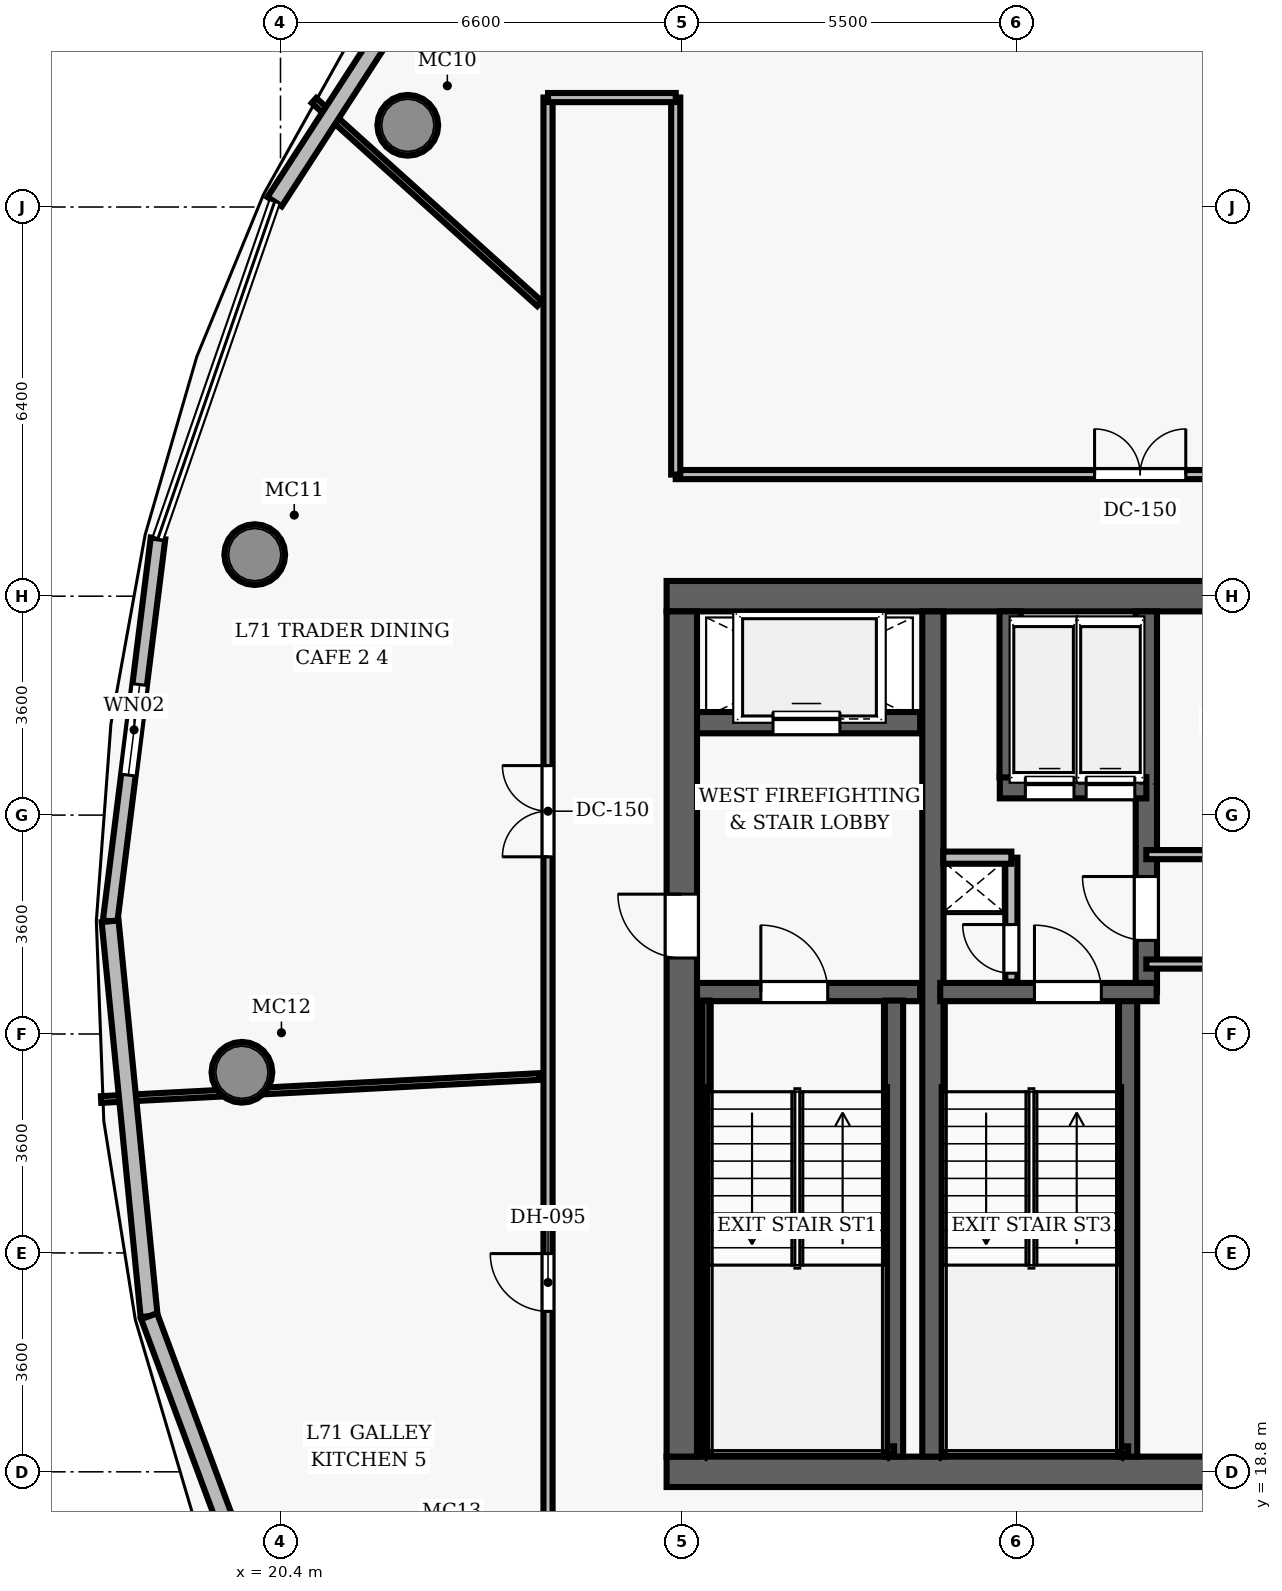
"""IFC4 building model, lengths in metres.
Left out: names, types, materials, properties, quantities, classifications, styles, units other than length and angle.
Written with IfcOpenShell. Run it as: python <this file> out.ifc"""

import sys

from ifc_helpers import new_model, si_unit, direction, frame, frame_2d, origin, origin_2d, place, context, subcontext, project, spatial, rectangle, hollow_circle, extrude, element, fill, save


model = new_model("IFC4")
c1 = context("Model", 3, precision=1e-05, world=origin(), true_north=direction((0.0, 1.0)))
c2 = subcontext(c1, "Body", "Model", "MODEL_VIEW")
j1 = project(units=[si_unit("LENGTHUNIT", "METRE"), si_unit("PLANEANGLEUNIT", "RADIAN")], contexts=[c1])
p1 = place(None, origin())
s1 = spatial("IfcSite", under=j1, at=p1, CompositionType="ELEMENT")
p2 = place(p1, origin())
s2 = spatial("IfcBuilding", under=s1, at=p2, CompositionType="ELEMENT")
p3 = place(p2, frame((0.0, 0.0, 280.55)))
s3 = spatial("IfcBuildingStorey", under=s2, at=p3, CompositionType="ELEMENT", Elevation=280.55)
p4 = place(p3, frame((26.75, 18.8, 0.0), z_axis=(0.0, 0.0, 1.0), x_axis=(1.0, 0.0, 0.0)))
e1 = element("IfcWall", 1, at=p4, inside=s3, PredefinedType="SHEAR", context=c2, shape_type="SweptSolid", body=[
    extrude(rectangle(XDim=22.5, YDim=0.5, at=frame_2d((11.25, 0.0))), origin(), (0.0, 0.0, 1.0), 3.85),
])
p5 = place(p4, frame((14.47, 0.0, 0.0)))
e2 = element("IfcOpeningElement", 2, at=p5, cuts=e1, PredefinedType="OPENING", context=c2, shape_type="SweptSolid", body=[
    extrude(rectangle(XDim=1.05, YDim=2.15, at=frame_2d((0.525, 1.075))), frame((0.0, 0.26, 0.0), z_axis=(0.0, -1.0, 0.0), x_axis=(1.0, 0.0, 0.0)), (0.0, 0.0, 1.0), 0.52),
])
p6 = place(p3, frame((26.75, 33.2, 0.0), z_axis=(0.0, 0.0, 1.0), x_axis=(1.0, 0.0, 0.0)))
e3 = element("IfcWall", 3, at=p6, inside=s3, PredefinedType="SHEAR", context=c2, shape_type="SweptSolid", body=[
    extrude(rectangle(XDim=22.5, YDim=0.5, at=frame_2d((11.25, 0.0))), origin(), (0.0, 0.0, 1.0), 3.85),
])
p7 = place(p3, frame((27.0, 19.05, 0.0), z_axis=(0.0, 0.0, 1.0), x_axis=(0.0, 1.0, 0.0)))
e4 = element("IfcWall", 4, at=p7, inside=s3, PredefinedType="SHEAR", context=c2, shape_type="SweptSolid", body=[
    extrude(rectangle(XDim=13.9, YDim=0.5, at=frame_2d((6.95, 0.0))), origin(), (0.0, 0.0, 1.0), 3.85),
])
p8 = place(p7, frame((8.2, 0.0, 0.0)))
e5 = element("IfcOpeningElement", 5, at=p8, cuts=e4, PredefinedType="OPENING", context=c2, shape_type="SweptSolid", body=[
    extrude(rectangle(XDim=1.05, YDim=2.15, at=frame_2d((0.525, 1.075))), frame((0.0, 0.26, 0.0), z_axis=(0.0, -1.0, 0.0), x_axis=(1.0, 0.0, 0.0)), (0.0, 0.0, 1.0), 0.52),
])
p9 = place(p3, frame((31.13, 19.05, 0.0), z_axis=(0.0, 0.0, 1.0), x_axis=(0.0, 1.0, 0.0)))
e6 = element("IfcWall", 6, at=p9, inside=s3, PredefinedType="SHEAR", context=c2, shape_type="SweptSolid", body=[
    extrude(rectangle(XDim=13.9, YDim=0.35, at=frame_2d((6.95, 0.0))), origin(), (0.0, 0.0, 1.0), 3.85),
])
for number, where, z_axis, x_axis in (
    (7, (22.494, 40.944, 0.0), (0.0, 0.0, 1.0), (1.0, 0.0, 0.0)),
    (8, (19.976, 33.884, 0.0), (0.0, 0.0, 1.0), (1.0, 0.0, 0.0)),
    (9, (19.765, 25.371, 0.0), (0.0, 0.0, 1.0), (1.0, 0.0, 0.0)),
):
    element("IfcColumn", number, at=place(p3, frame(where, z_axis=z_axis, x_axis=x_axis)), inside=s3, PredefinedType="COLUMN", context=c2, shape_type="SweptSolid", body=[
        extrude(hollow_circle(Radius=0.5, WallThickness=0.045, at=origin_2d()), origin(), (0.0, 0.0, 1.0), 3.85),
    ])
p10 = place(p3, frame((27.25, 26.69, 0.0), z_axis=(0.0, 0.0, 1.0), x_axis=(1.0, 0.0, 0.0)))
e10 = element("IfcWall", 10, at=p10, inside=s3, PredefinedType="SHEAR", context=c2, shape_type="SweptSolid", body=[
    extrude(rectangle(XDim=3.67, YDim=0.3, at=frame_2d((1.835, 0.0))), origin(), (0.0, 0.0, 1.0), 3.85),
])
p11 = place(p10, frame((1.05, 0.0, 0.0)))
e11 = element("IfcOpeningElement", 11, at=p11, cuts=e10, PredefinedType="OPENING", context=c2, shape_type="SweptSolid", body=[
    extrude(rectangle(XDim=1.1, YDim=2.15, at=frame_2d((0.55, 1.075))), frame((0.0, 0.16, 0.0), z_axis=(0.0, -1.0, 0.0), x_axis=(1.0, 0.0, 0.0)), (0.0, 0.0, 1.0), 0.32),
])
p12 = place(p3, frame((30.49, 19.05, 0.0), z_axis=(0.0, 0.0, 1.0), x_axis=(0.0, 1.0, 0.0)))
e12 = element("IfcWall", 12, at=p12, inside=s3, PredefinedType="SHEAR", context=c2, shape_type="SweptSolid", body=[
    extrude(rectangle(XDim=7.5, YDim=0.3, at=frame_2d((3.75, 0.0))), origin(), (0.0, 0.0, 1.0), 3.85),
])
p13 = place(p3, frame((27.395, 19.1, 0.0), z_axis=(0.0, 0.0, 1.0), x_axis=(0.0, 1.0, 0.0)))
e13 = element("IfcWall", 13, at=p13, inside=s3, PredefinedType="SHEAR", context=c2, shape_type="SweptSolid", body=[
    extrude(rectangle(XDim=7.45, YDim=0.12, at=frame_2d((3.725, 0.0))), origin(), (0.0, 0.0, 1.0), 3.85),
])
p14 = place(p3, frame((27.395, 19.16, 0.0), z_axis=(0.0, 0.0, 1.0), x_axis=(1.0, 0.0, 0.0)))
e14 = element("IfcWall", 14, at=p14, inside=s3, PredefinedType="SHEAR", context=c2, shape_type="SweptSolid", body=[
    extrude(rectangle(XDim=3.095, YDim=0.12, at=frame_2d((1.547, 0.0))), origin(), (0.0, 0.0, 1.0), 3.85),
])
p15 = place(p3, frame((27.25, 31.12, 0.0), z_axis=(0.0, 0.0, 1.0), x_axis=(1.0, 0.0, 0.0)))
e15 = element("IfcWall", 15, at=p15, inside=s3, PredefinedType="SHEAR", context=c2, shape_type="SweptSolid", body=[
    extrude(rectangle(XDim=3.67, YDim=0.35, at=frame_2d((1.835, 0.0))), origin(), (0.0, 0.0, 1.0), 3.04),
])
p16 = place(p15, frame((1.25, 0.0, 0.0)))
e16 = element("IfcOpeningElement", 16, at=p16, cuts=e15, PredefinedType="OPENING", context=c2, shape_type="SweptSolid", body=[
    extrude(rectangle(XDim=1.1, YDim=2.15, at=frame_2d((0.55, 1.075))), frame((0.0, 0.185, 0.0), z_axis=(0.0, -1.0, 0.0), x_axis=(1.0, 0.0, 0.0)), (0.0, 0.0, 1.0), 0.37),
])
p17 = place(p3, frame((34.34, 19.05, 0.0), z_axis=(0.0, 0.0, 1.0), x_axis=(0.0, 1.0, 0.0)))
e17 = element("IfcWall", 17, at=p17, inside=s3, PredefinedType="SHEAR", context=c2, shape_type="SweptSolid", body=[
    extrude(rectangle(XDim=7.5, YDim=0.3, at=frame_2d((3.75, 0.0))), origin(), (0.0, 0.0, 1.0), 3.85),
])
p18 = place(p3, frame((34.64, 26.69, 0.0), z_axis=(0.0, 0.0, 1.0), x_axis=(0.0, 1.0, 0.0)))
e18 = element("IfcWall", 18, at=p18, inside=s3, PredefinedType="SHEAR", context=c2, shape_type="SweptSolid", body=[
    extrude(rectangle(XDim=6.26, YDim=0.35, at=frame_2d((3.13, 0.0))), origin(), (0.0, 0.0, 1.0), 3.85),
])
p19 = place(p18, frame((0.85, 0.0, 0.0)))
e19 = element("IfcOpeningElement", 19, at=p19, cuts=e18, PredefinedType="OPENING", context=c2, shape_type="SweptSolid", body=[
    extrude(rectangle(XDim=1.05, YDim=2.15, at=frame_2d((0.525, 1.075))), frame((0.0, 0.185, 0.0), z_axis=(0.0, -1.0, 0.0), x_axis=(1.0, 0.0, 0.0)), (0.0, 0.0, 1.0), 0.37),
])
p20 = place(p3, frame((31.25, 26.69, 0.0), z_axis=(0.0, 0.0, 1.0), x_axis=(1.0, 0.0, 0.0)))
e20 = element("IfcWall", 20, at=p20, inside=s3, PredefinedType="SHEAR", context=c2, shape_type="SweptSolid", body=[
    extrude(rectangle(XDim=3.56, YDim=0.3, at=frame_2d((1.78, 0.0))), origin(), (0.0, 0.0, 1.0), 3.85),
])
p21 = place(p20, frame((1.55, 0.0, 0.0)))
e21 = element("IfcOpeningElement", 21, at=p21, cuts=e20, PredefinedType="OPENING", context=c2, shape_type="SweptSolid", body=[
    extrude(rectangle(XDim=1.1, YDim=2.15, at=frame_2d((0.55, 1.075))), frame((0.0, 0.16, 0.0), z_axis=(0.0, -1.0, 0.0), x_axis=(1.0, 0.0, 0.0)), (0.0, 0.0, 1.0), 0.32),
])
p22 = place(p3, frame((31.3, 19.16, 0.0), z_axis=(0.0, 0.0, 1.0), x_axis=(1.0, 0.0, 0.0)))
e22 = element("IfcWall", 22, at=p22, inside=s3, PredefinedType="SHEAR", context=c2, shape_type="SweptSolid", body=[
    extrude(rectangle(XDim=3.04, YDim=0.12, at=frame_2d((1.52, 0.0))), origin(), (0.0, 0.0, 1.0), 3.85),
])
p23 = place(p3, frame((32.23, 30.05, 0.0), z_axis=(0.0, 0.0, 1.0), x_axis=(1.0, 0.0, 0.0)))
e23 = element("IfcWall", 23, at=p23, inside=s3, PredefinedType="SHEAR", context=c2, shape_type="SweptSolid", body=[
    extrude(rectangle(XDim=2.41, YDim=0.35, at=frame_2d((1.205, 0.0))), origin(), (0.0, 0.0, 1.0), 3.04),
])
p24 = place(p23, frame((0.42, 0.0, 0.0)))
e24 = element("IfcOpeningElement", 24, at=p24, cuts=e23, PredefinedType="OPENING", context=c2, shape_type="SweptSolid", body=[
    extrude(rectangle(XDim=0.8, YDim=2.15, at=frame_2d((0.4, 1.075))), frame((0.0, 0.185, 0.0), z_axis=(0.0, -1.0, 0.0), x_axis=(1.0, 0.0, 0.0)), (0.0, 0.0, 1.0), 0.37),
])
p25 = place(p23, frame((1.42, 0.0, 0.0)))
e25 = element("IfcOpeningElement", 25, at=p25, cuts=e23, PredefinedType="OPENING", context=c2, shape_type="SweptSolid", body=[
    extrude(rectangle(XDim=0.8, YDim=2.15, at=frame_2d((0.4, 1.075))), frame((0.0, 0.185, 0.0), z_axis=(0.0, -1.0, 0.0), x_axis=(1.0, 0.0, 0.0)), (0.0, 0.0, 1.0), 0.37),
])
p26 = place(p3, frame((32.4, 30.22, 0.0), z_axis=(0.0, 0.0, 1.0), x_axis=(0.0, 1.0, 0.0)))
e26 = element("IfcWall", 26, at=p26, inside=s3, PredefinedType="SHEAR", context=c2, shape_type="SweptSolid", body=[
    extrude(rectangle(XDim=2.73, YDim=0.35, at=frame_2d((1.365, 0.0))), origin(), (0.0, 0.0, 1.0), 3.04),
])
p27 = place(p3, frame((32.42, 26.86, 0.0), z_axis=(0.0, 0.0, 1.0), x_axis=(0.0, 1.0, 0.0)))
e27 = element("IfcWall", 27, at=p27, inside=s3, PredefinedType="PARTITIONING", context=c2, shape_type="SweptSolid", body=[
    extrude(rectangle(XDim=2.04, YDim=0.2, at=frame_2d((1.02, 0.0))), origin(), (0.0, 0.0, 1.0), 3.04),
])
p28 = place(p27, frame((0.14, 0.0, 0.0)))
e28 = element("IfcOpeningElement", 28, at=p28, cuts=e27, PredefinedType="OPENING", context=c2, shape_type="SweptSolid", body=[
    extrude(rectangle(XDim=0.8, YDim=2.05, at=frame_2d((0.4, 1.025))), frame((0.0, 0.11, 0.0), z_axis=(0.0, -1.0, 0.0), x_axis=(1.0, 0.0, 0.0)), (0.0, 0.0, 1.0), 0.22),
])
p29 = place(p3, frame((31.3, 28.9, 0.0), z_axis=(0.0, 0.0, 1.0), x_axis=(1.0, 0.0, 0.0)))
e29 = element("IfcWall", 29, at=p29, inside=s3, PredefinedType="PARTITIONING", context=c2, shape_type="SweptSolid", body=[
    extrude(rectangle(XDim=1.12, YDim=0.2, at=frame_2d((0.56, 0.0))), origin(), (0.0, 0.0, 1.0), 3.04),
])
for number, where, z_axis, x_axis in (
    (30, (34.64, 27.15, 0.0), (0.0, 0.0, 1.0), (1.0, 0.0, 0.0)),
    (31, (34.64, 28.95, 0.0), (0.0, 0.0, 1.0), (1.0, 0.0, 0.0)),
):
    element("IfcWall", number, at=place(p3, frame(where, z_axis=z_axis, x_axis=x_axis)), inside=s3, PredefinedType="PARTITIONING", context=c2, shape_type="SweptSolid", body=[
        extrude(rectangle(XDim=6.36, YDim=0.15, at=frame_2d((3.18, 0.0))), origin(), (0.0, 0.0, 1.0), 3.04),
    ])
p30 = place(p3, frame((26.9, 35.2, 0.0), z_axis=(0.0, 0.0, 1.0), x_axis=(1.0, 0.0, 0.0)))
e32 = element("IfcWall", 32, at=p30, inside=s3, PredefinedType="PARTITIONING", context=c2, shape_type="SweptSolid", body=[
    extrude(rectangle(XDim=10.05, YDim=0.15, at=frame_2d((5.025, 0.0))), origin(), (0.0, 0.0, 1.0), 3.04),
])
p31 = place(p30, frame((6.888, 0.0, 0.0)))
e33 = element("IfcOpeningElement", 33, at=p31, cuts=e32, PredefinedType="OPENING", context=c2, shape_type="SweptSolid", body=[
    extrude(rectangle(XDim=1.5, YDim=2.2, at=frame_2d((0.75, 1.1))), frame((0.0, 0.085, 0.0), z_axis=(0.0, -1.0, 0.0), x_axis=(1.0, 0.0, 0.0)), (0.0, 0.0, 1.0), 0.17),
])
p32 = place(p3, frame((24.8, 10.6, 0.0), z_axis=(0.0, 0.0, 1.0), x_axis=(0.0, 1.0, 0.0)))
e34 = element("IfcWall", 34, at=p32, inside=s3, PredefinedType="PARTITIONING", context=c2, shape_type="SweptSolid", body=[
    extrude(rectangle(XDim=30.8, YDim=0.15, at=frame_2d((15.4, 0.0))), origin(), (0.0, 0.0, 1.0), 3.04),
])
p33 = place(p32, frame((18.314, 0.0, 0.0)))
e35 = element("IfcOpeningElement", 35, at=p33, cuts=e34, PredefinedType="OPENING", context=c2, shape_type="SweptSolid", body=[
    extrude(rectangle(XDim=1.5, YDim=2.2, at=frame_2d((0.75, 1.1))), frame((0.0, 0.085, 0.0), z_axis=(0.0, -1.0, 0.0), x_axis=(1.0, 0.0, 0.0)), (0.0, 0.0, 1.0), 0.17),
])
p34 = place(p32, frame((10.839, 0.0, 0.0)))
e36 = element("IfcOpeningElement", 36, at=p34, cuts=e34, PredefinedType="OPENING", context=c2, shape_type="SweptSolid", body=[
    extrude(rectangle(XDim=0.95, YDim=2.15, at=frame_2d((0.475, 1.075))), frame((0.0, 0.085, 0.0), z_axis=(0.0, -1.0, 0.0), x_axis=(1.0, 0.0, 0.0)), (0.0, 0.0, 1.0), 0.17),
])
p35 = place(p3, frame((26.9, 35.2, 0.0), z_axis=(0.0, 0.0, 1.0), x_axis=(0.0, 1.0, 0.0)))
e37 = element("IfcWall", 37, at=p35, inside=s3, PredefinedType="PARTITIONING", context=c2, shape_type="SweptSolid", body=[
    extrude(rectangle(XDim=6.2, YDim=0.15, at=frame_2d((3.1, 0.0))), origin(), (0.0, 0.0, 1.0), 3.04),
])
p36 = place(p3, frame((24.8, 41.4, 0.0), z_axis=(0.0, 0.0, 1.0), x_axis=(1.0, 0.0, 0.0)))
e38 = element("IfcWall", 38, at=p36, inside=s3, PredefinedType="PARTITIONING", context=c2, shape_type="SweptSolid", body=[
    extrude(rectangle(XDim=2.1, YDim=0.15, at=frame_2d((1.05, 0.0))), origin(), (0.0, 0.0, 1.0), 3.04),
])
p37 = place(p3, frame((24.66, 38.011, 0.0), z_axis=(0.0, 0.0, 1.0), x_axis=(-0.743140900874, 0.669134965047, 0.0)))
e39 = element("IfcWall", 39, at=p37, inside=s3, PredefinedType="PARTITIONING", context=c2, shape_type="SweptSolid", body=[
    extrude(rectangle(XDim=4.991, YDim=0.11, at=frame_2d((2.496, 0.0))), origin(), (0.0, 0.0, 1.0), 3.04),
])
p38 = place(p3, frame((24.66, 25.301, 0.0), z_axis=(0.0, 0.0, 1.0), x_axis=(-0.998631060723, -0.05230683091, 0.0)))
e40 = element("IfcWall", 40, at=p38, inside=s3, PredefinedType="PARTITIONING", context=c2, shape_type="SweptSolid", body=[
    extrude(rectangle(XDim=7.22, YDim=0.11, at=frame_2d((3.61, 0.0))), origin(), (0.0, 0.0, 1.0), 3.04),
])
p39 = place(p3, frame((20.303, 39.688, 0.0), z_axis=(0.0, 0.0, 1.0), x_axis=(0.543851193818, 0.839181672216, 0.0)))
e41 = element("IfcWall", 41, at=p39, inside=s3, PredefinedType="SOLIDWALL", context=c2, shape_type="SweptSolid", body=[
    extrude(rectangle(XDim=5.179, YDim=0.28, at=frame_2d((2.59, 0.0))), origin(), (0.0, 0.0, 1.0), 3.625),
])
p40 = place(p3, frame((17.598, 27.854, 0.0), z_axis=(0.0, 0.0, 1.0), x_axis=(0.124124709547, 0.992266625701, 0.0)))
e42 = element("IfcWall", 42, at=p40, inside=s3, PredefinedType="SOLIDWALL", context=c2, shape_type="SweptSolid", body=[
    extrude(rectangle(XDim=6.345, YDim=0.24, at=frame_2d((3.173, 0.0))), origin(), (0.0, 0.0, 1.0), 3.625),
])
p41 = place(p40, frame((2.423, 0.0, 0.85)))
e43 = element("IfcOpeningElement", 43, at=p41, cuts=e42, PredefinedType="OPENING", context=c2, shape_type="SweptSolid", body=[
    extrude(rectangle(XDim=1.5, YDim=1.8, at=frame_2d((0.75, 0.9))), frame((0.0, 0.13, 0.0), z_axis=(0.0, -1.0, 0.0), x_axis=(1.0, 0.0, 0.0)), (0.0, 0.0, 1.0), 0.26),
])
p42 = place(p3, frame((18.239, 21.36, 0.0), z_axis=(0.0, 0.0, 1.0), x_axis=(-0.098314662397, 0.9951553784, 0.0)))
e44 = element("IfcWall", 44, at=p42, inside=s3, PredefinedType="SOLIDWALL", context=c2, shape_type="SweptSolid", body=[
    extrude(rectangle(XDim=6.526, YDim=0.28, at=frame_2d((3.263, 0.0))), origin(), (0.0, 0.0, 1.0), 3.625),
])
p43 = place(p3, frame((20.511, 15.24, 0.0), z_axis=(0.0, 0.0, 1.0), x_axis=(-0.348039084876, 0.937480024, 0.0)))
e45 = element("IfcWall", 45, at=p43, inside=s3, PredefinedType="SOLIDWALL", context=c2, shape_type="SweptSolid", body=[
    extrude(rectangle(XDim=6.527, YDim=0.28, at=frame_2d((3.264, 0.0))), origin(), (0.0, 0.0, 1.0), 3.625),
])
p44 = place(p11, origin())
e46 = element("IfcDoor", 46, at=p44, inside=s3, OperationType="SINGLE_SWING_LEFT", PredefinedType="DOOR", context=c2, shape_type="SweptSolid", body=[
    extrude(rectangle(XDim=1.1, YDim=2.15, at=frame_2d((0.55, 1.075))), frame((0.0, 0.025, 0.0), z_axis=(0.0, -1.0, 0.0), x_axis=(1.0, 0.0, 0.0)), (0.0, 0.0, 1.0), 0.05),
])
fill(e11, e46)
p45 = place(p8, origin())
e47 = element("IfcDoor", 47, at=p45, inside=s3, OperationType="SINGLE_SWING_RIGHT", PredefinedType="DOOR", context=c2, shape_type="SweptSolid", body=[
    extrude(rectangle(XDim=1.05, YDim=2.15, at=frame_2d((0.525, 1.075))), frame((0.0, 0.025, 0.0), z_axis=(0.0, -1.0, 0.0), x_axis=(1.0, 0.0, 0.0)), (0.0, 0.0, 1.0), 0.05),
])
fill(e5, e47)
p46 = place(p21, origin())
e48 = element("IfcDoor", 48, at=p46, inside=s3, OperationType="SINGLE_SWING_LEFT", PredefinedType="DOOR", context=c2, shape_type="SweptSolid", body=[
    extrude(rectangle(XDim=1.1, YDim=2.15, at=frame_2d((0.55, 1.075))), frame((0.0, 0.025, 0.0), z_axis=(0.0, -1.0, 0.0), x_axis=(1.0, 0.0, 0.0)), (0.0, 0.0, 1.0), 0.05),
])
fill(e21, e48)
p47 = place(p28, origin())
e49 = element("IfcDoor", 49, at=p47, inside=s3, OperationType="SINGLE_SWING_RIGHT", PredefinedType="DOOR", context=c2, shape_type="SweptSolid", body=[
    extrude(rectangle(XDim=0.8, YDim=2.05, at=frame_2d((0.4, 1.025))), frame((0.0, 0.025, 0.0), z_axis=(0.0, -1.0, 0.0), x_axis=(1.0, 0.0, 0.0)), (0.0, 0.0, 1.0), 0.05),
])
fill(e28, e49)
p48 = place(p19, origin())
e50 = element("IfcDoor", 50, at=p48, inside=s3, OperationType="SINGLE_SWING_RIGHT", PredefinedType="DOOR", context=c2, shape_type="SweptSolid", body=[
    extrude(rectangle(XDim=1.05, YDim=2.15, at=frame_2d((0.525, 1.075))), frame((0.0, 0.025, 0.0), z_axis=(0.0, -1.0, 0.0), x_axis=(1.0, 0.0, 0.0)), (0.0, 0.0, 1.0), 0.05),
])
fill(e19, e50)
p49 = place(p31, origin())
e51 = element("IfcDoor", 51, at=p49, inside=s3, OperationType="DOUBLE_DOOR_SINGLE_SWING", PredefinedType="DOOR", context=c2, shape_type="SweptSolid", body=[
    extrude(rectangle(XDim=1.5, YDim=2.2, at=frame_2d((0.75, 1.1))), frame((0.0, 0.025, 0.0), z_axis=(0.0, -1.0, 0.0), x_axis=(1.0, 0.0, 0.0)), (0.0, 0.0, 1.0), 0.05),
])
fill(e33, e51)
p50 = place(p33, origin())
e52 = element("IfcDoor", 52, at=p50, inside=s3, OperationType="DOUBLE_DOOR_SINGLE_SWING", PredefinedType="DOOR", context=c2, shape_type="SweptSolid", body=[
    extrude(rectangle(XDim=1.5, YDim=2.2, at=frame_2d((0.75, 1.1))), frame((0.0, 0.025, 0.0), z_axis=(0.0, -1.0, 0.0), x_axis=(1.0, 0.0, 0.0)), (0.0, 0.0, 1.0), 0.05),
])
fill(e35, e52)
p51 = place(p34, origin())
e53 = element("IfcDoor", 53, at=p51, inside=s3, OperationType="SINGLE_SWING_RIGHT", PredefinedType="DOOR", context=c2, shape_type="SweptSolid", body=[
    extrude(rectangle(XDim=0.95, YDim=2.15, at=frame_2d((0.475, 1.075))), frame((0.0, 0.025, 0.0), z_axis=(0.0, -1.0, 0.0), x_axis=(1.0, 0.0, 0.0)), (0.0, 0.0, 1.0), 0.05),
])
fill(e36, e53)
p52 = place(p16, origin())
e54 = element("IfcDoor", 54, at=p52, inside=s3, OperationType="SLIDING_TO_LEFT", PredefinedType="DOOR", context=c2, shape_type="SweptSolid", body=[
    extrude(rectangle(XDim=1.1, YDim=2.15, at=frame_2d((0.55, 1.075))), frame((0.0, 0.025, 0.0), z_axis=(0.0, -1.0, 0.0), x_axis=(1.0, 0.0, 0.0)), (0.0, 0.0, 1.0), 0.05),
])
fill(e16, e54)
p53 = place(p24, origin())
e55 = element("IfcDoor", 55, at=p53, inside=s3, OperationType="SLIDING_TO_LEFT", PredefinedType="DOOR", context=c2, shape_type="SweptSolid", body=[
    extrude(rectangle(XDim=0.8, YDim=2.15, at=frame_2d((0.4, 1.075))), frame((0.0, 0.025, 0.0), z_axis=(0.0, -1.0, 0.0), x_axis=(1.0, 0.0, 0.0)), (0.0, 0.0, 1.0), 0.05),
])
fill(e24, e55)
p54 = place(p25, origin())
e56 = element("IfcDoor", 56, at=p54, inside=s3, OperationType="SLIDING_TO_LEFT", PredefinedType="DOOR", context=c2, shape_type="SweptSolid", body=[
    extrude(rectangle(XDim=0.8, YDim=2.15, at=frame_2d((0.4, 1.075))), frame((0.0, 0.025, 0.0), z_axis=(0.0, -1.0, 0.0), x_axis=(1.0, 0.0, 0.0)), (0.0, 0.0, 1.0), 0.05),
])
fill(e25, e56)
p55 = place(p41, origin())
e57 = element("IfcWindow", 57, at=p55, inside=s3, PartitioningType="SINGLE_PANEL", PredefinedType="WINDOW", context=c2, shape_type="SweptSolid", body=[
    extrude(rectangle(XDim=1.5, YDim=1.8, at=frame_2d((0.75, 0.9))), frame((0.0, 0.03, 0.0), z_axis=(0.0, -1.0, 0.0), x_axis=(1.0, 0.0, 0.0)), (0.0, 0.0, 1.0), 0.06),
])
fill(e43, e57)
save(model, sys.argv[1])
